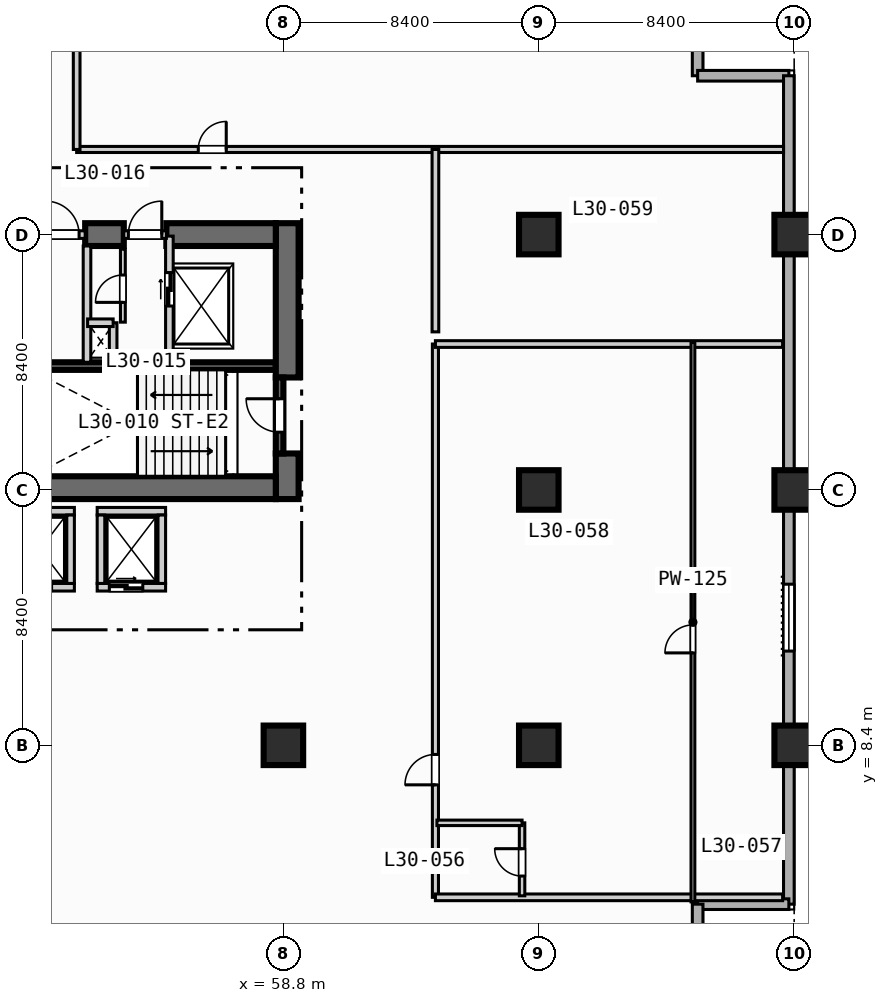
"""IFC4 building model, lengths in metres.
Left out: names, types, materials, properties, quantities, classifications, styles, units other than length and angle.
Written with IfcOpenShell. Run it as: python <this file> out.ifc"""

import sys

from ifc_helpers import new_model, si_unit, direction, frame, frame_2d, origin, origin_2d, place, context, subcontext, project, spatial, rectangle, extrude, element, fill, save


model = new_model("IFC4")
c1 = context("Model", 3, precision=1e-05, world=origin(), true_north=direction((0.0, 1.0)))
c2 = subcontext(c1, "Body", "Model", "MODEL_VIEW")
j1 = project(units=[si_unit("LENGTHUNIT", "METRE"), si_unit("PLANEANGLEUNIT", "RADIAN")], contexts=[c1])
p1 = place(None, origin())
s1 = spatial("IfcSite", under=j1, at=p1, CompositionType="ELEMENT")
p2 = place(p1, origin())
s2 = spatial("IfcBuilding", under=s1, at=p2, CompositionType="ELEMENT")
p3 = place(p2, frame((0.0, 0.0, 126.6)))
s3 = spatial("IfcBuildingStorey", under=s2, at=p3, CompositionType="ELEMENT", Elevation=126.6)
p4 = place(p3, frame((50.5, 20.875, 0.0), z_axis=(0.0, 0.0, 1.0), x_axis=(1.0, 0.0, 0.0)))
e1 = element("IfcWall", 1, at=p4, inside=s3, PredefinedType="SOLIDWALL", context=c2, shape_type="SweptSolid", body=[
    extrude(rectangle(XDim=8.05, YDim=0.25, at=frame_2d((4.025, 0.0))), origin(), (0.0, 0.0, 1.0), 3.55),
])
p5 = place(p3, frame((58.925, 16.5, 0.0), z_axis=(0.0, 0.0, 1.0), x_axis=(0.0, 1.0, 0.0)))
e2 = element("IfcWall", 2, at=p5, inside=s3, PredefinedType="SHEAR", context=c2, shape_type="SweptSolid", body=[
    extrude(rectangle(XDim=1.5, YDim=0.75, at=frame_2d((0.75, 0.0))), origin(), (0.0, 0.0, 1.0), 3.55),
])
p6 = place(p3, frame((58.925, 20.5, 0.0), z_axis=(0.0, 0.0, 1.0), x_axis=(0.0, 1.0, 0.0)))
e3 = element("IfcWall", 3, at=p6, inside=s3, PredefinedType="SHEAR", context=c2, shape_type="SweptSolid", body=[
    extrude(rectangle(XDim=5.075, YDim=0.75, at=frame_2d((2.538, 0.0))), origin(), (0.0, 0.0, 1.0), 3.55),
])
p7 = place(p3, frame((42.2, 16.875, 0.0), z_axis=(0.0, 0.0, 1.0), x_axis=(1.0, 0.0, 0.0)))
e4 = element("IfcWall", 4, at=p7, inside=s3, PredefinedType="SHEAR", context=c2, shape_type="SweptSolid", body=[
    extrude(rectangle(XDim=16.35, YDim=0.75, at=frame_2d((8.175, 0.0))), origin(), (0.0, 0.0, 1.0), 3.55),
])
p8 = place(p3, frame((52.28, 25.2, 0.0), z_axis=(0.0, 0.0, 1.0), x_axis=(1.0, 0.0, 0.0)))
e5 = element("IfcWall", 5, at=p8, inside=s3, PredefinedType="SHEAR", context=c2, shape_type="SweptSolid", body=[
    extrude(rectangle(XDim=1.27, YDim=0.75, at=frame_2d((0.635, 0.0))), origin(), (0.0, 0.0, 1.0), 3.55),
])
p9 = place(p3, frame((54.95, 25.2, 0.0), z_axis=(0.0, 0.0, 1.0), x_axis=(1.0, 0.0, 0.0)))
e6 = element("IfcWall", 6, at=p9, inside=s3, PredefinedType="SHEAR", context=c2, shape_type="SweptSolid", body=[
    extrude(rectangle(XDim=3.6, YDim=0.75, at=frame_2d((1.8, 0.0))), origin(), (0.0, 0.0, 1.0), 3.55),
])
for number, where, z_axis, x_axis in (
    (7, (58.8, 8.4, 0.0), (0.0, 0.0, 1.0), (1.0, 0.0, 0.0)),
    (8, (67.2, 8.4, 0.0), (0.0, 0.0, 1.0), (1.0, 0.0, 0.0)),
    (9, (67.2, 16.8, 0.0), (0.0, 0.0, 1.0), (1.0, 0.0, 0.0)),
    (10, (67.2, 25.2, 0.0), (0.0, 0.0, 1.0), (1.0, 0.0, 0.0)),
    (11, (75.6, 8.4, 0.0), (0.0, 0.0, 1.0), (1.0, 0.0, 0.0)),
    (12, (75.6, 16.8, 0.0), (0.0, 0.0, 1.0), (1.0, 0.0, 0.0)),
    (13, (75.6, 25.2, 0.0), (0.0, 0.0, 1.0), (1.0, 0.0, 0.0)),
):
    element("IfcColumn", number, at=place(p3, frame(where, z_axis=z_axis, x_axis=x_axis)), inside=s3, PredefinedType="COLUMN", context=c2, shape_type="SweptSolid", body=[
        extrude(rectangle(XDim=1.3, YDim=1.3, at=origin_2d()), origin(), (0.0, 0.0, 1.0), 3.8),
    ])
for number, where, z_axis, x_axis in (
    (14, (72.425, 33.425, 0.0), (0.0, 0.0, 1.0), (0.0, -1.0, 0.0)),
    (15, (72.425, 30.425, 0.0), (0.0, 0.0, 1.0), (1.0, 0.0, 0.0)),
):
    element("IfcWall", number, at=place(p3, frame(where, z_axis=z_axis, x_axis=x_axis)), inside=s3, PredefinedType="STANDARD", context=c2, shape_type="SweptSolid", body=[
        extrude(rectangle(XDim=3.0, YDim=0.35, at=frame_2d((1.5, 0.0))), origin(), (0.0, 0.0, 1.0), 3.55),
    ])
p10 = place(p3, frame((75.425, 30.425, 0.0), z_axis=(0.0, 0.0, 1.0), x_axis=(0.0, -1.0, 0.0)))
e16 = element("IfcWall", 16, at=p10, inside=s3, PredefinedType="STANDARD", context=c2, shape_type="SweptSolid", body=[
    extrude(rectangle(XDim=27.25, YDim=0.35, at=frame_2d((13.625, 0.0))), origin(), (0.0, 0.0, 1.0), 3.55),
])
p11 = place(p10, frame((16.725, 0.0, 0.85)))
e17 = element("IfcOpeningElement", 17, at=p11, cuts=e16, PredefinedType="OPENING", context=c2, shape_type="SweptSolid", body=[
    extrude(rectangle(XDim=2.2, YDim=1.8, at=frame_2d((1.1, 0.9))), frame((0.0, 0.185, 0.0), z_axis=(0.0, -1.0, 0.0), x_axis=(1.0, 0.0, 0.0)), (0.0, 0.0, 1.0), 0.37),
])
for number, where, z_axis, x_axis in (
    (18, (75.425, 3.175, 0.0), (0.0, 0.0, 1.0), (-1.0, 0.0, 0.0)),
    (19, (72.425, 3.175, 0.0), (0.0, 0.0, 1.0), (0.0, -1.0, 0.0)),
):
    element("IfcWall", number, at=place(p3, frame(where, z_axis=z_axis, x_axis=x_axis)), inside=s3, PredefinedType="STANDARD", context=c2, shape_type="SweptSolid", body=[
        extrude(rectangle(XDim=3.0, YDim=0.35, at=frame_2d((1.5, 0.0))), origin(), (0.0, 0.0, 1.0), 3.55),
    ])
p12 = place(p3, frame((58.675, 18.0, 0.0), z_axis=(0.0, 0.0, 1.0), x_axis=(0.0, 1.0, 0.0)))
e20 = element("IfcWall", 20, at=p12, inside=s3, PredefinedType="SOLIDWALL", context=c2, shape_type="SweptSolid", body=[
    extrude(rectangle(XDim=2.5, YDim=0.25, at=frame_2d((1.25, 0.0))), origin(), (0.0, 0.0, 1.0), 3.55),
])
p13 = place(p12, frame((0.7, 0.0, 0.0)))
e21 = element("IfcOpeningElement", 21, at=p13, cuts=e20, PredefinedType="OPENING", context=c2, shape_type="SweptSolid", body=[
    extrude(rectangle(XDim=1.1, YDim=2.15, at=frame_2d((0.55, 1.075))), frame((0.0, 0.135, 0.0), z_axis=(0.0, -1.0, 0.0), x_axis=(1.0, 0.0, 0.0)), (0.0, 0.0, 1.0), 0.27),
])
p14 = place(p3, frame((50.8, 25.2, 0.0), z_axis=(0.0, 0.0, 1.0), x_axis=(1.0, 0.0, 0.0)))
e22 = element("IfcWall", 22, at=p14, inside=s3, PredefinedType="SOLIDWALL", context=c2, shape_type="SweptSolid", body=[
    extrude(rectangle(XDim=1.48, YDim=0.25, at=frame_2d((0.74, 0.0))), origin(), (0.0, 0.0, 1.0), 3.55),
])
p15 = place(p14, frame((0.18, 0.0, 0.0)))
e23 = element("IfcOpeningElement", 23, at=p15, cuts=e22, PredefinedType="OPENING", context=c2, shape_type="SweptSolid", body=[
    extrude(rectangle(XDim=1.1, YDim=2.15, at=frame_2d((0.55, 1.075))), frame((0.0, 0.135, 0.0), z_axis=(0.0, -1.0, 0.0), x_axis=(1.0, 0.0, 0.0)), (0.0, 0.0, 1.0), 0.27),
])
p16 = place(p3, frame((52.34, 21.0, 0.0), z_axis=(0.0, 0.0, 1.0), x_axis=(0.0, 1.0, 0.0)))
e24 = element("IfcWall", 24, at=p16, inside=s3, PredefinedType="SOLIDWALL", context=c2, shape_type="SweptSolid", body=[
    extrude(rectangle(XDim=3.825, YDim=0.25, at=frame_2d((1.913, 0.0))), origin(), (0.0, 0.0, 1.0), 3.55),
])
p17 = place(p3, frame((55.05, 21.0, 0.0), z_axis=(0.0, 0.0, 1.0), x_axis=(0.0, 1.0, 0.0)))
e25 = element("IfcWall", 25, at=p17, inside=s3, PredefinedType="SOLIDWALL", context=c2, shape_type="SweptSolid", body=[
    extrude(rectangle(XDim=4.15, YDim=0.25, at=frame_2d((2.075, 0.0))), origin(), (0.0, 0.0, 1.0), 3.55),
])
p18 = place(p17, frame((1.85, 0.0, 0.0)))
e26 = element("IfcOpeningElement", 26, at=p18, cuts=e25, PredefinedType="OPENING", context=c2, shape_type="SweptSolid", body=[
    extrude(rectangle(XDim=1.1, YDim=2.15, at=frame_2d((0.55, 1.075))), frame((0.0, 0.135, 0.0), z_axis=(0.0, -1.0, 0.0), x_axis=(1.0, 0.0, 0.0)), (0.0, 0.0, 1.0), 0.27),
])
p19 = place(p3, frame((53.55, 25.2, 0.0), z_axis=(0.0, 0.0, 1.0), x_axis=(1.0, 0.0, 0.0)))
e27 = element("IfcWall", 27, at=p19, inside=s3, PredefinedType="SOLIDWALL", context=c2, shape_type="SweptSolid", body=[
    extrude(rectangle(XDim=1.4, YDim=0.25, at=frame_2d((0.7, 0.0))), origin(), (0.0, 0.0, 1.0), 3.55),
])
p20 = place(p19, frame((0.15, 0.0, 0.0)))
e28 = element("IfcOpeningElement", 28, at=p20, cuts=e27, PredefinedType="OPENING", context=c2, shape_type="SweptSolid", body=[
    extrude(rectangle(XDim=1.1, YDim=2.15, at=frame_2d((0.55, 1.075))), frame((0.0, 0.135, 0.0), z_axis=(0.0, -1.0, 0.0), x_axis=(1.0, 0.0, 0.0)), (0.0, 0.0, 1.0), 0.27),
])
p21 = place(p3, frame((53.2, 21.0, 0.0), z_axis=(0.0, 0.0, 1.0), x_axis=(0.0, 1.0, 0.0)))
e29 = element("IfcWall", 29, at=p21, inside=s3, PredefinedType="SOLIDWALL", context=c2, shape_type="SweptSolid", body=[
    extrude(rectangle(XDim=1.3, YDim=0.25, at=frame_2d((0.65, 0.0))), origin(), (0.0, 0.0, 1.0), 3.55),
])
p22 = place(p3, frame((52.36, 22.3, 0.0), z_axis=(0.0, 0.0, 1.0), x_axis=(1.0, 0.0, 0.0)))
e30 = element("IfcWall", 30, at=p22, inside=s3, PredefinedType="SOLIDWALL", context=c2, shape_type="SweptSolid", body=[
    extrude(rectangle(XDim=0.84, YDim=0.25, at=frame_2d((0.42, 0.0))), origin(), (0.0, 0.0, 1.0), 3.55),
])
p23 = place(p3, frame((53.52, 22.32, 0.0), z_axis=(0.0, 0.0, 1.0), x_axis=(0.0, 1.0, 0.0)))
e31 = element("IfcWall", 31, at=p23, inside=s3, PredefinedType="PARTITIONING", context=c2, shape_type="SweptSolid", body=[
    extrude(rectangle(XDim=2.4, YDim=0.16, at=frame_2d((1.2, 0.0))), origin(), (0.0, 0.0, 1.0), 3.55),
])
p24 = place(p23, frame((0.65, 0.0, 0.0)))
e32 = element("IfcOpeningElement", 32, at=p24, cuts=e31, PredefinedType="OPENING", context=c2, shape_type="SweptSolid", body=[
    extrude(rectangle(XDim=0.9, YDim=2.1, at=frame_2d((0.45, 1.05))), frame((0.0, 0.09, 0.0), z_axis=(0.0, -1.0, 0.0), x_axis=(1.0, 0.0, 0.0)), (0.0, 0.0, 1.0), 0.18),
])
p25 = place(p3, frame((49.675, 13.6, 0.0), z_axis=(0.0, 0.0, 1.0), x_axis=(1.0, 0.0, 0.0)))
e33 = element("IfcWall", 33, at=p25, inside=s3, PredefinedType="SOLIDWALL", context=c2, shape_type="SweptSolid", body=[
    extrude(rectangle(XDim=2.25, YDim=0.25, at=frame_2d((1.125, 0.0))), origin(), (0.0, 0.0, 1.0), 3.55),
])
p26 = place(p25, frame((0.4, 0.0, 0.0)))
e34 = element("IfcOpeningElement", 34, at=p26, cuts=e33, PredefinedType="OPENING", context=c2, shape_type="SweptSolid", body=[
    extrude(rectangle(XDim=1.1, YDim=2.15, at=frame_2d((0.55, 1.075))), frame((0.0, 0.135, 0.0), z_axis=(0.0, -1.0, 0.0), x_axis=(1.0, 0.0, 0.0)), (0.0, 0.0, 1.0), 0.27),
])
for number, where, z_axis, x_axis in (
    (35, (49.675, 16.1, 0.0), (0.0, 0.0, 1.0), (1.0, 0.0, 0.0)),
    (36, (51.8, 13.725, 0.0), (0.0, 0.0, 1.0), (0.0, 1.0, 0.0)),
):
    element("IfcWall", number, at=place(p3, frame(where, z_axis=z_axis, x_axis=x_axis)), inside=s3, PredefinedType="SOLIDWALL", context=c2, shape_type="SweptSolid", body=[
        extrude(rectangle(XDim=2.25, YDim=0.25, at=frame_2d((1.125, 0.0))), origin(), (0.0, 0.0, 1.0), 3.55),
    ])
p27 = place(p3, frame((52.675, 13.6, 0.0), z_axis=(0.0, 0.0, 1.0), x_axis=(1.0, 0.0, 0.0)))
e37 = element("IfcWall", 37, at=p27, inside=s3, PredefinedType="SOLIDWALL", context=c2, shape_type="SweptSolid", body=[
    extrude(rectangle(XDim=2.25, YDim=0.25, at=frame_2d((1.125, 0.0))), origin(), (0.0, 0.0, 1.0), 3.55),
])
p28 = place(p27, frame((0.4, 0.0, 0.0)))
e38 = element("IfcOpeningElement", 38, at=p28, cuts=e37, PredefinedType="OPENING", context=c2, shape_type="SweptSolid", body=[
    extrude(rectangle(XDim=1.1, YDim=2.15, at=frame_2d((0.55, 1.075))), frame((0.0, 0.135, 0.0), z_axis=(0.0, -1.0, 0.0), x_axis=(1.0, 0.0, 0.0)), (0.0, 0.0, 1.0), 0.27),
])
for number, where, z_axis, x_axis in (
    (39, (52.675, 16.1, 0.0), (0.0, 0.0, 1.0), (1.0, 0.0, 0.0)),
    (40, (52.8, 13.725, 0.0), (0.0, 0.0, 1.0), (0.0, 1.0, 0.0)),
    (41, (54.8, 13.725, 0.0), (0.0, 0.0, 1.0), (0.0, 1.0, 0.0)),
):
    element("IfcWall", number, at=place(p3, frame(where, z_axis=z_axis, x_axis=x_axis)), inside=s3, PredefinedType="SOLIDWALL", context=c2, shape_type="SweptSolid", body=[
        extrude(rectangle(XDim=2.25, YDim=0.25, at=frame_2d((1.125, 0.0))), origin(), (0.0, 0.0, 1.0), 3.55),
    ])
p29 = place(p3, frame((63.8, 3.4, 0.0), z_axis=(0.0, 0.0, 1.0), x_axis=(0.0, 1.0, 0.0)))
e42 = element("IfcWall", 42, at=p29, inside=s3, PredefinedType="PARTITIONING", context=c2, shape_type="SweptSolid", body=[
    extrude(rectangle(XDim=18.2, YDim=0.2, at=frame_2d((9.1, 0.0))), origin(), (0.0, 0.0, 1.0), 3.55),
])
p30 = place(p29, frame((3.7, 0.0, 0.0)))
e43 = element("IfcOpeningElement", 43, at=p30, cuts=e42, PredefinedType="OPENING", context=c2, shape_type="SweptSolid", body=[
    extrude(rectangle(XDim=1.0, YDim=2.15, at=frame_2d((0.5, 1.075))), frame((0.0, 0.11, 0.0), z_axis=(0.0, -1.0, 0.0), x_axis=(1.0, 0.0, 0.0)), (0.0, 0.0, 1.0), 0.22),
])
for number, where, z_axis, x_axis in (
    (44, (63.8, 3.4, 0.0), (0.0, 0.0, 1.0), (1.0, 0.0, 0.0)),
    (45, (63.8, 21.6, 0.0), (0.0, 0.0, 1.0), (1.0, 0.0, 0.0)),
):
    element("IfcWall", number, at=place(p3, frame(where, z_axis=z_axis, x_axis=x_axis)), inside=s3, PredefinedType="PARTITIONING", context=c2, shape_type="SweptSolid", body=[
        extrude(rectangle(XDim=11.42, YDim=0.22, at=frame_2d((5.71, 0.0))), origin(), (0.0, 0.0, 1.0), 3.55),
    ])
p31 = place(p3, frame((66.65, 3.45, 0.0), z_axis=(0.0, 0.0, 1.0), x_axis=(0.0, 1.0, 0.0)))
e46 = element("IfcWall", 46, at=p31, inside=s3, PredefinedType="PLUMBINGWALL", context=c2, shape_type="SweptSolid", body=[
    extrude(rectangle(XDim=2.4, YDim=0.18, at=frame_2d((1.2, 0.0))), origin(), (0.0, 0.0, 1.0), 3.55),
])
p32 = place(p31, frame((0.65, 0.0, 0.0)))
e47 = element("IfcOpeningElement", 47, at=p32, cuts=e46, PredefinedType="OPENING", context=c2, shape_type="SweptSolid", body=[
    extrude(rectangle(XDim=0.9, YDim=2.1, at=frame_2d((0.45, 1.05))), frame((0.0, 0.1, 0.0), z_axis=(0.0, -1.0, 0.0), x_axis=(1.0, 0.0, 0.0)), (0.0, 0.0, 1.0), 0.2),
])
p33 = place(p3, frame((63.85, 5.85, 0.0), z_axis=(0.0, 0.0, 1.0), x_axis=(1.0, 0.0, 0.0)))
e48 = element("IfcWall", 48, at=p33, inside=s3, PredefinedType="PLUMBINGWALL", context=c2, shape_type="SweptSolid", body=[
    extrude(rectangle(XDim=2.8, YDim=0.18, at=frame_2d((1.4, 0.0))), origin(), (0.0, 0.0, 1.0), 3.55),
])
p34 = place(p3, frame((72.27, 3.25, 0.0), z_axis=(0.0, 0.0, 1.0), x_axis=(0.0, 1.0, 0.0)))
e49 = element("IfcWall", 49, at=p34, inside=s3, PredefinedType="PARTITIONING", context=c2, shape_type="SweptSolid", body=[
    extrude(rectangle(XDim=18.4, YDim=0.125, at=frame_2d((9.2, 0.0))), origin(), (0.0, 0.0, 1.0), 3.55),
])
p35 = place(p34, frame((8.19, 0.0, 0.0)))
e50 = element("IfcOpeningElement", 50, at=p35, cuts=e49, PredefinedType="OPENING", context=c2, shape_type="SweptSolid", body=[
    extrude(rectangle(XDim=0.92, YDim=2.1, at=frame_2d((0.46, 1.05))), frame((0.0, 0.073, 0.0), z_axis=(0.0, -1.0, 0.0), x_axis=(1.0, 0.0, 0.0)), (0.0, 0.0, 1.0), 0.145),
])
p36 = place(p3, frame((52.0, 28.0, 0.0), z_axis=(0.0, 0.0, 1.0), x_axis=(1.0, 0.0, 0.0)))
e51 = element("IfcWall", 51, at=p36, inside=s3, PredefinedType="PARTITIONING", context=c2, shape_type="SweptSolid", body=[
    extrude(rectangle(XDim=23.25, YDim=0.2, at=frame_2d((11.625, 0.0))), origin(), (0.0, 0.0, 1.0), 3.55),
])
p37 = place(p36, frame((4.0, 0.0, 0.0)))
e52 = element("IfcOpeningElement", 52, at=p37, cuts=e51, PredefinedType="OPENING", context=c2, shape_type="SweptSolid", body=[
    extrude(rectangle(XDim=0.92, YDim=2.1, at=frame_2d((0.46, 1.05))), frame((0.0, 0.11, 0.0), z_axis=(0.0, -1.0, 0.0), x_axis=(1.0, 0.0, 0.0)), (0.0, 0.0, 1.0), 0.22),
])
p38 = place(p3, frame((52.0, 28.0, 0.0), z_axis=(0.0, 0.0, 1.0), x_axis=(0.0, 1.0, 0.0)))
e53 = element("IfcWall", 53, at=p38, inside=s3, PredefinedType="PARTITIONING", context=c2, shape_type="SweptSolid", body=[
    extrude(rectangle(XDim=5.3, YDim=0.22, at=frame_2d((2.65, 0.0))), origin(), (0.0, 0.0, 1.0), 3.55),
])
p39 = place(p3, frame((63.8, 22.0, 0.0), z_axis=(0.0, 0.0, 1.0), x_axis=(0.0, 1.0, 0.0)))
e54 = element("IfcWall", 54, at=p39, inside=s3, PredefinedType="PARTITIONING", context=c2, shape_type="SweptSolid", body=[
    extrude(rectangle(XDim=6.0, YDim=0.22, at=frame_2d((3.0, 0.0))), origin(), (0.0, 0.0, 1.0), 3.55),
])
p40 = place(p11, origin())
e55 = element("IfcWindow", 55, at=p40, inside=s3, PartitioningType="SINGLE_PANEL", PredefinedType="WINDOW", context=c2, shape_type="SweptSolid", body=[
    extrude(rectangle(XDim=2.2, YDim=1.8, at=frame_2d((1.1, 0.9))), frame((0.0, 0.03, 0.0), z_axis=(0.0, -1.0, 0.0), x_axis=(1.0, 0.0, 0.0)), (0.0, 0.0, 1.0), 0.06),
])
fill(e17, e55)
p41 = place(p13, origin())
e56 = element("IfcDoor", 56, at=p41, inside=s3, OperationType="SINGLE_SWING_RIGHT", PredefinedType="DOOR", context=c2, shape_type="SweptSolid", body=[
    extrude(rectangle(XDim=1.1, YDim=2.15, at=frame_2d((0.55, 1.075))), frame((0.0, 0.025, 0.0), z_axis=(0.0, -1.0, 0.0), x_axis=(1.0, 0.0, 0.0)), (0.0, 0.0, 1.0), 0.05),
])
fill(e21, e56)
p42 = place(p15, origin())
e57 = element("IfcDoor", 57, at=p42, inside=s3, OperationType="SINGLE_SWING_LEFT", PredefinedType="DOOR", context=c2, shape_type="SweptSolid", body=[
    extrude(rectangle(XDim=1.1, YDim=2.15, at=frame_2d((0.55, 1.075))), frame((0.0, 0.025, 0.0), z_axis=(0.0, -1.0, 0.0), x_axis=(1.0, 0.0, 0.0)), (0.0, 0.0, 1.0), 0.05),
])
fill(e23, e57)
p43 = place(p18, origin())
e58 = element("IfcDoor", 58, at=p43, inside=s3, OperationType="SLIDING_TO_LEFT", PredefinedType="DOOR", context=c2, shape_type="SweptSolid", body=[
    extrude(rectangle(XDim=1.1, YDim=2.15, at=frame_2d((0.55, 1.075))), frame((0.0, 0.025, 0.0), z_axis=(0.0, -1.0, 0.0), x_axis=(1.0, 0.0, 0.0)), (0.0, 0.0, 1.0), 0.05),
])
fill(e26, e58)
p44 = place(p20, origin())
e59 = element("IfcDoor", 59, at=p44, inside=s3, OperationType="SINGLE_SWING_RIGHT", PredefinedType="DOOR", context=c2, shape_type="SweptSolid", body=[
    extrude(rectangle(XDim=1.1, YDim=2.15, at=frame_2d((0.55, 1.075))), frame((0.0, 0.025, 0.0), z_axis=(0.0, -1.0, 0.0), x_axis=(1.0, 0.0, 0.0)), (0.0, 0.0, 1.0), 0.05),
])
fill(e28, e59)
p45 = place(p24, origin())
e60 = element("IfcDoor", 60, at=p45, inside=s3, OperationType="SINGLE_SWING_LEFT", PredefinedType="DOOR", context=c2, shape_type="SweptSolid", body=[
    extrude(rectangle(XDim=0.9, YDim=2.1, at=frame_2d((0.45, 1.05))), frame((0.0, 0.025, 0.0), z_axis=(0.0, -1.0, 0.0), x_axis=(1.0, 0.0, 0.0)), (0.0, 0.0, 1.0), 0.05),
])
fill(e32, e60)
p46 = place(p28, origin())
e61 = element("IfcDoor", 61, at=p46, inside=s3, OperationType="SLIDING_TO_LEFT", PredefinedType="DOOR", context=c2, shape_type="SweptSolid", body=[
    extrude(rectangle(XDim=1.1, YDim=2.15, at=frame_2d((0.55, 1.075))), frame((0.0, 0.025, 0.0), z_axis=(0.0, -1.0, 0.0), x_axis=(1.0, 0.0, 0.0)), (0.0, 0.0, 1.0), 0.05),
])
fill(e38, e61)
p47 = place(p30, origin())
e62 = element("IfcDoor", 62, at=p47, inside=s3, OperationType="SINGLE_SWING_LEFT", PredefinedType="DOOR", context=c2, shape_type="SweptSolid", body=[
    extrude(rectangle(XDim=1.0, YDim=2.15, at=frame_2d((0.5, 1.075))), frame((0.0, 0.025, 0.0), z_axis=(0.0, -1.0, 0.0), x_axis=(1.0, 0.0, 0.0)), (0.0, 0.0, 1.0), 0.05),
])
fill(e43, e62)
p48 = place(p32, origin())
e63 = element("IfcDoor", 63, at=p48, inside=s3, OperationType="SINGLE_SWING_RIGHT", PredefinedType="DOOR", context=c2, shape_type="SweptSolid", body=[
    extrude(rectangle(XDim=0.9, YDim=2.1, at=frame_2d((0.45, 1.05))), frame((0.0, 0.025, 0.0), z_axis=(0.0, -1.0, 0.0), x_axis=(1.0, 0.0, 0.0)), (0.0, 0.0, 1.0), 0.05),
])
fill(e47, e63)
p49 = place(p35, origin())
e64 = element("IfcDoor", 64, at=p49, inside=s3, OperationType="SINGLE_SWING_LEFT", PredefinedType="DOOR", context=c2, shape_type="SweptSolid", body=[
    extrude(rectangle(XDim=0.92, YDim=2.1, at=frame_2d((0.46, 1.05))), frame((0.0, 0.025, 0.0), z_axis=(0.0, -1.0, 0.0), x_axis=(1.0, 0.0, 0.0)), (0.0, 0.0, 1.0), 0.05),
])
fill(e50, e64)
p50 = place(p37, origin())
e65 = element("IfcDoor", 65, at=p50, inside=s3, OperationType="SINGLE_SWING_RIGHT", PredefinedType="DOOR", context=c2, shape_type="SweptSolid", body=[
    extrude(rectangle(XDim=0.92, YDim=2.1, at=frame_2d((0.46, 1.05))), frame((0.0, 0.025, 0.0), z_axis=(0.0, -1.0, 0.0), x_axis=(1.0, 0.0, 0.0)), (0.0, 0.0, 1.0), 0.05),
])
fill(e52, e65)
save(model, sys.argv[1])
